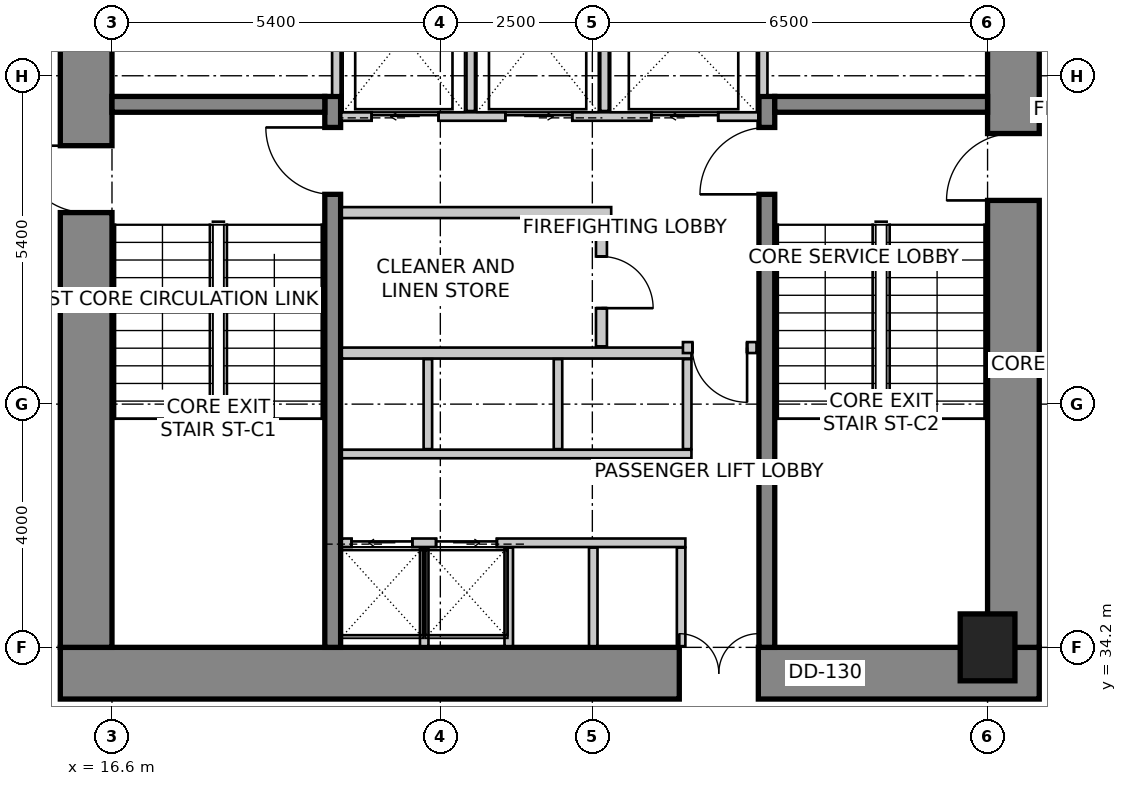
"""IFC4 building model, lengths in metres.
Left out: names, types, materials, properties, quantities, classifications, styles, units other than length and angle.
Written with IfcOpenShell. Run it as: python <this file> out.ifc"""

import sys

from ifc_helpers import new_model, si_unit, direction, frame, frame_2d, origin, origin_2d, place, context, subcontext, project, spatial, rectangle, extrude, source, transform, mapped, element, fill, save


model = new_model("IFC4")
c1 = context("Model", 3, precision=1e-05, world=origin(), true_north=direction((0.0, 1.0)))
c2 = subcontext(c1, "Body", "Model", "MODEL_VIEW")
j1 = project(units=[si_unit("LENGTHUNIT", "METRE"), si_unit("PLANEANGLEUNIT", "RADIAN")], contexts=[c1])
p1 = place(None, origin())
s1 = spatial("IfcSite", under=j1, at=p1, CompositionType="ELEMENT")
p2 = place(p1, origin())
s2 = spatial("IfcBuilding", under=s1, at=p2, CompositionType="ELEMENT")
p3 = place(p2, frame((0.0, 0.0, 43.0)))
s3 = spatial("IfcBuildingStorey", under=s2, at=p3, CompositionType="ELEMENT", Elevation=43.0)
p4 = place(p3, frame((15.75, 33.775, 0.0), z_axis=(0.0, 0.0, 1.0), x_axis=(1.0, 0.0, 0.0)))
e1 = element("IfcWall", 1, at=p4, inside=s3, PredefinedType="SHEAR", context=c2, shape_type="SweptSolid", body=[
    extrude(rectangle(XDim=16.1, YDim=0.85, at=frame_2d((8.05, 0.0))), origin(), (0.0, 0.0, 1.0), 4.0),
])
m1 = source(origin(), c2, "Body", "SweptSolid", [
    extrude(rectangle(XDim=1.3, YDim=2.15, at=frame_2d((0.65, 1.075))), frame((0.0, 0.435, 0.0), z_axis=(0.0, -1.0, 0.0), x_axis=(1.0, 0.0, 0.0)), (0.0, 0.0, 1.0), 0.87),
])
p5 = place(p4, frame((10.18, 0.0, 0.0)))
e2 = element("IfcOpeningElement", 2, at=p5, cuts=e1, PredefinedType="OPENING", context=c2, shape_type="MappedRepresentation", body=[
    mapped(m1, transform((0.0, 0.0, 0.0), scale=1.0)),
])
p6 = place(p3, frame((16.175, 34.2, 0.0), z_axis=(0.0, 0.0, 1.0), x_axis=(0.0, 1.0, 0.0)))
e3 = element("IfcWall", 3, at=p6, inside=s3, PredefinedType="SHEAR", context=c2, shape_type="SweptSolid", body=[
    extrude(rectangle(XDim=11.4, YDim=0.85, at=frame_2d((5.7, 0.0))), origin(), (0.0, 0.0, 1.0), 4.0),
])
m2 = source(origin(), c2, "Body", "SweptSolid", [
    extrude(rectangle(XDim=1.1, YDim=2.15, at=frame_2d((0.55, 1.075))), frame((0.0, 0.435, 0.0), z_axis=(0.0, -1.0, 0.0), x_axis=(1.0, 0.0, 0.0)), (0.0, 0.0, 1.0), 0.87),
])
p7 = place(p6, frame((7.15, 0.0, 0.0)))
e4 = element("IfcOpeningElement", 4, at=p7, cuts=e3, PredefinedType="OPENING", context=c2, shape_type="MappedRepresentation", body=[
    mapped(m2, transform((0.0, 0.0, 0.0), scale=1.0)),
])
p8 = place(p3, frame((31.425, 34.2, 0.0), z_axis=(0.0, 0.0, 1.0), x_axis=(0.0, 1.0, 0.0)))
e5 = element("IfcWall", 5, at=p8, inside=s3, PredefinedType="SHEAR", context=c2, shape_type="SweptSolid", body=[
    extrude(rectangle(XDim=11.4, YDim=0.85, at=frame_2d((5.7, 0.0))), origin(), (0.0, 0.0, 1.0), 4.0),
])
p9 = place(p8, frame((7.35, 0.0, 0.0)))
e6 = element("IfcOpeningElement", 6, at=p9, cuts=e5, PredefinedType="OPENING", context=c2, shape_type="MappedRepresentation", body=[
    mapped(m2, transform((0.0, 0.0, 0.0), scale=1.0)),
])
p10 = place(p3, frame((20.23, 34.2, 0.0), z_axis=(0.0, 0.0, 1.0), x_axis=(0.0, 1.0, 0.0)))
e7 = element("IfcWall", 7, at=p10, inside=s3, PredefinedType="SHEAR", context=c2, shape_type="SweptSolid", body=[
    extrude(rectangle(XDim=9.06, YDim=0.26, at=frame_2d((4.53, 0.0))), origin(), (0.0, 0.0, 1.0), 4.0),
])
m3 = source(origin(), c2, "Body", "SweptSolid", [
    extrude(rectangle(XDim=1.1, YDim=2.15, at=frame_2d((0.55, 1.075))), frame((0.0, 0.14, 0.0), z_axis=(0.0, -1.0, 0.0), x_axis=(1.0, 0.0, 0.0)), (0.0, 0.0, 1.0), 0.28),
])
p11 = place(p10, frame((7.45, 0.0, 0.0)))
e8 = element("IfcOpeningElement", 8, at=p11, cuts=e7, PredefinedType="OPENING", context=c2, shape_type="MappedRepresentation", body=[
    mapped(m3, transform((0.0, 0.0, 0.0), scale=1.0)),
])
p12 = place(p3, frame((27.37, 34.2, 0.0), z_axis=(0.0, 0.0, 1.0), x_axis=(0.0, 1.0, 0.0)))
e9 = element("IfcWall", 9, at=p12, inside=s3, PredefinedType="SHEAR", context=c2, shape_type="SweptSolid", body=[
    extrude(rectangle(XDim=9.06, YDim=0.26, at=frame_2d((4.53, 0.0))), origin(), (0.0, 0.0, 1.0), 4.0),
])
p13 = place(p12, frame((7.45, 0.0, 0.0)))
e10 = element("IfcOpeningElement", 10, at=p13, cuts=e9, PredefinedType="OPENING", context=c2, shape_type="MappedRepresentation", body=[
    mapped(m3, transform((0.0, 0.0, 0.0), scale=1.0)),
])
for number, where, z_axis, x_axis in (
    (11, (16.6, 43.13, 0.0), (0.0, 0.0, 1.0), (1.0, 0.0, 0.0)),
    (12, (27.5, 43.13, 0.0), (0.0, 0.0, 1.0), (1.0, 0.0, 0.0)),
):
    element("IfcWall", number, at=place(p3, frame(where, z_axis=z_axis, x_axis=x_axis)), inside=s3, PredefinedType="SHEAR", context=c2, shape_type="SweptSolid", body=[
        extrude(rectangle(XDim=3.5, YDim=0.26, at=frame_2d((1.75, 0.0))), origin(), (0.0, 0.0, 1.0), 4.0),
    ])
m4 = source(origin(), c2, "Body", "SweptSolid", [
    extrude(rectangle(XDim=0.9, YDim=1.1, at=origin_2d()), origin(), (0.0, 0.0, 1.0), 4.0),
])
p14 = place(p3, frame((31.0, 34.2, 0.0), z_axis=(0.0, 0.0, 1.0), x_axis=(1.0, 0.0, 0.0)))
e13 = element("IfcColumn", 13, at=p14, inside=s3, PredefinedType="COLUMN", context=c2, shape_type="MappedRepresentation", body=[
    mapped(m4, transform((0.0, 0.0, 0.0), scale=1.0)),
])
p15 = place(p3, frame((20.37, 42.93, 0.0), z_axis=(0.0, 0.0, 1.0), x_axis=(1.0, 0.0, 0.0)))
e14 = element("IfcWall", 14, at=p15, inside=s3, PredefinedType="SOLIDWALL", context=c2, shape_type="SweptSolid", body=[
    extrude(rectangle(XDim=6.86, YDim=0.14, at=frame_2d((3.43, 0.0))), origin(), (0.0, 0.0, 1.0), 3.75),
])
m5 = source(origin(), c2, "Body", "SweptSolid", [
    extrude(rectangle(XDim=1.1, YDim=2.15, at=frame_2d((0.55, 1.075))), frame((0.0, 0.08, 0.0), z_axis=(0.0, -1.0, 0.0), x_axis=(1.0, 0.0, 0.0)), (0.0, 0.0, 1.0), 0.16),
])
p16 = place(p15, frame((0.5, 0.0, 0.0)))
e15 = element("IfcOpeningElement", 15, at=p16, cuts=e14, PredefinedType="OPENING", context=c2, shape_type="MappedRepresentation", body=[
    mapped(m5, transform((0.0, 0.0, 0.0), scale=1.0)),
])
p17 = place(p15, frame((2.7, 0.0, 0.0)))
e16 = element("IfcOpeningElement", 16, at=p17, cuts=e14, PredefinedType="OPENING", context=c2, shape_type="MappedRepresentation", body=[
    mapped(m5, transform((0.0, 0.0, 0.0), scale=1.0)),
])
p18 = place(p15, frame((5.1, 0.0, 0.0)))
e17 = element("IfcOpeningElement", 17, at=p18, cuts=e14, PredefinedType="OPENING", context=c2, shape_type="MappedRepresentation", body=[
    mapped(m5, transform((0.0, 0.0, 0.0), scale=1.0)),
])
for number, where, z_axis, x_axis in (
    (18, (20.29, 43.28, 0.0), (0.0, 0.0, 1.0), (0.0, 1.0, 0.0)),
    (19, (27.31, 43.28, 0.0), (0.0, 0.0, 1.0), (0.0, 1.0, 0.0)),
):
    element("IfcWall", number, at=place(p3, frame(where, z_axis=z_axis, x_axis=x_axis)), inside=s3, PredefinedType="SOLIDWALL", context=c2, shape_type="SweptSolid", body=[
        extrude(rectangle(XDim=2.3, YDim=0.14, at=frame_2d((1.15, 0.0))), origin(), (0.0, 0.0, 1.0), 3.75),
    ])
for number, where, z_axis, x_axis in (
    (20, (22.5, 43.02, 0.0), (0.0, 0.0, 1.0), (0.0, 1.0, 0.0)),
    (21, (24.7, 43.02, 0.0), (0.0, 0.0, 1.0), (0.0, 1.0, 0.0)),
):
    element("IfcWall", number, at=place(p3, frame(where, z_axis=z_axis, x_axis=x_axis)), inside=s3, PredefinedType="SOLIDWALL", context=c2, shape_type="SweptSolid", body=[
        extrude(rectangle(XDim=2.56, YDim=0.14, at=frame_2d((1.28, 0.0))), origin(), (0.0, 0.0, 1.0), 3.75),
    ])
p19 = place(p3, frame((20.38, 35.92, 0.0), z_axis=(0.0, 0.0, 1.0), x_axis=(1.0, 0.0, 0.0)))
e22 = element("IfcWall", 22, at=p19, inside=s3, PredefinedType="SOLIDWALL", context=c2, shape_type="SweptSolid", body=[
    extrude(rectangle(XDim=5.65, YDim=0.14, at=frame_2d((2.825, 0.0))), origin(), (0.0, 0.0, 1.0), 3.75),
])
m6 = source(origin(), c2, "Body", "SweptSolid", [
    extrude(rectangle(XDim=1.0, YDim=2.15, at=frame_2d((0.5, 1.075))), frame((0.0, 0.08, 0.0), z_axis=(0.0, -1.0, 0.0), x_axis=(1.0, 0.0, 0.0)), (0.0, 0.0, 1.0), 0.16),
])
p20 = place(p19, frame((0.16, 0.0, 0.0)))
e23 = element("IfcOpeningElement", 23, at=p20, cuts=e22, PredefinedType="OPENING", context=c2, shape_type="MappedRepresentation", body=[
    mapped(m6, transform((0.0, 0.0, 0.0), scale=1.0)),
])
p21 = place(p19, frame((1.55, 0.0, 0.0)))
e24 = element("IfcOpeningElement", 24, at=p21, cuts=e22, PredefinedType="OPENING", context=c2, shape_type="MappedRepresentation", body=[
    mapped(m6, transform((0.0, 0.0, 0.0), scale=1.0)),
])
for number, where, z_axis, x_axis in (
    (25, (25.96, 34.22, 0.0), (0.0, 0.0, 1.0), (0.0, 1.0, 0.0)),
    (26, (21.735, 34.22, 0.0), (0.0, 0.0, 1.0), (0.0, 1.0, 0.0)),
    (27, (23.125, 34.22, 0.0), (0.0, 0.0, 1.0), (0.0, 1.0, 0.0)),
    (28, (24.515, 34.22, 0.0), (0.0, 0.0, 1.0), (0.0, 1.0, 0.0)),
):
    element("IfcWall", number, at=place(p3, frame(where, z_axis=z_axis, x_axis=x_axis)), inside=s3, PredefinedType="SOLIDWALL", context=c2, shape_type="SweptSolid", body=[
        extrude(rectangle(XDim=1.62, YDim=0.14, at=frame_2d((0.81, 0.0))), origin(), (0.0, 0.0, 1.0), 3.042),
    ])
p22 = place(p3, frame((20.38, 37.38, 0.0), z_axis=(0.0, 0.0, 1.0), x_axis=(1.0, 0.0, 0.0)))
e29 = element("IfcWall", 29, at=p22, inside=s3, PredefinedType="SOLIDWALL", context=c2, shape_type="SweptSolid", body=[
    extrude(rectangle(XDim=5.75, YDim=0.14, at=frame_2d((2.875, 0.0))), origin(), (0.0, 0.0, 1.0), 3.75),
])
p23 = place(p3, frame((20.38, 39.04, 0.0), z_axis=(0.0, 0.0, 1.0), x_axis=(1.0, 0.0, 0.0)))
e30 = element("IfcWall", 30, at=p23, inside=s3, PredefinedType="SOLIDWALL", context=c2, shape_type="SweptSolid", body=[
    extrude(rectangle(XDim=5.75, YDim=0.18, at=frame_2d((2.875, 0.0))), origin(), (0.0, 0.0, 1.0), 3.75),
])
for number, where, z_axis, x_axis in (
    (31, (26.06, 37.46, 0.0), (0.0, 0.0, 1.0), (0.0, 1.0, 0.0)),
    (32, (21.795, 37.46, 0.0), (0.0, 0.0, 1.0), (0.0, 1.0, 0.0)),
    (33, (23.935, 37.46, 0.0), (0.0, 0.0, 1.0), (0.0, 1.0, 0.0)),
):
    element("IfcWall", number, at=place(p3, frame(where, z_axis=z_axis, x_axis=x_axis)), inside=s3, PredefinedType="SOLIDWALL", context=c2, shape_type="SweptSolid", body=[
        extrude(rectangle(XDim=1.48, YDim=0.14, at=frame_2d((0.74, 0.0))), origin(), (0.0, 0.0, 1.0), 3.75),
    ])
p24 = place(p3, frame((24.81, 41.35, 0.0), z_axis=(0.0, 0.0, 1.0), x_axis=(-1.0, 0.0, 0.0)))
e34 = element("IfcWall", 34, at=p24, inside=s3, PredefinedType="PARTITIONING", context=c2, shape_type="SweptSolid", body=[
    extrude(rectangle(XDim=4.43, YDim=0.18, at=frame_2d((2.215, 0.0))), origin(), (0.0, 0.0, 1.0), 3.75),
])
p25 = place(p3, frame((24.65, 41.256, 0.0), z_axis=(0.0, 0.0, 1.0), x_axis=(0.0, -1.0, 0.0)))
e35 = element("IfcWall", 35, at=p25, inside=s3, PredefinedType="PARTITIONING", context=c2, shape_type="SweptSolid", body=[
    extrude(rectangle(XDim=2.106, YDim=0.18, at=frame_2d((1.053, 0.0))), origin(), (0.0, 0.0, 1.0), 3.75),
])
m7 = source(origin(), c2, "Body", "SweptSolid", [
    extrude(rectangle(XDim=0.85, YDim=2.15, at=frame_2d((0.425, 1.075))), frame((0.0, 0.1, 0.0), z_axis=(0.0, -1.0, 0.0), x_axis=(1.0, 0.0, 0.0)), (0.0, 0.0, 1.0), 0.2),
])
p26 = place(p25, frame((0.628, 0.0, 0.0)))
e36 = element("IfcOpeningElement", 36, at=p26, cuts=e35, PredefinedType="OPENING", context=c2, shape_type="MappedRepresentation", body=[
    mapped(m7, transform((0.0, 0.0, 0.0), scale=1.0)),
])
p27 = place(p3, frame((27.2, 39.13, 0.0), z_axis=(0.0, 0.0, 1.0), x_axis=(-1.0, 0.0, 0.0)))
e37 = element("IfcWall", 37, at=p27, inside=s3, PredefinedType="PARTITIONING", context=c2, shape_type="SweptSolid", body=[
    extrude(rectangle(XDim=1.21, YDim=0.18, at=frame_2d((0.605, 0.0))), origin(), (0.0, 0.0, 1.0), 3.75),
])
m8 = source(origin(), c2, "Body", "SweptSolid", [
    extrude(rectangle(XDim=0.9, YDim=2.15, at=frame_2d((0.45, 1.075))), frame((0.0, 0.1, 0.0), z_axis=(0.0, -1.0, 0.0), x_axis=(1.0, 0.0, 0.0)), (0.0, 0.0, 1.0), 0.2),
])
p28 = place(p27, frame((0.155, 0.0, 0.0)))
e38 = element("IfcOpeningElement", 38, at=p28, cuts=e37, PredefinedType="OPENING", context=c2, shape_type="MappedRepresentation", body=[
    mapped(m8, transform((0.0, 0.0, 0.0), scale=1.0)),
])
m9 = source(origin(), c2, "Body", "SweptSolid", [
    extrude(rectangle(XDim=1.1, YDim=2.15, at=frame_2d((0.55, 1.075))), frame((0.0, 0.025, 0.0), z_axis=(0.0, -1.0, 0.0), x_axis=(1.0, 0.0, 0.0)), (0.0, 0.0, 1.0), 0.05),
])
p29 = place(p16, origin())
e39 = element("IfcDoor", 39, at=p29, inside=s3, OperationType="SLIDING_TO_LEFT", PredefinedType="DOOR", context=c2, shape_type="MappedRepresentation", body=[
    mapped(m9, transform((0.0, 0.0, 0.0), scale=1.0)),
])
fill(e15, e39)
p30 = place(p17, origin())
e40 = element("IfcDoor", 40, at=p30, inside=s3, OperationType="SLIDING_TO_RIGHT", PredefinedType="DOOR", context=c2, shape_type="MappedRepresentation", body=[
    mapped(m9, transform((0.0, 0.0, 0.0), scale=1.0)),
])
fill(e16, e40)
m10 = source(origin(), c2, "Body", "SweptSolid", [
    extrude(rectangle(XDim=1.1, YDim=2.15, at=frame_2d((0.55, 1.075))), frame((0.0, 0.025, 0.0), z_axis=(0.0, -1.0, 0.0), x_axis=(1.0, 0.0, 0.0)), (0.0, 0.0, 1.0), 0.05),
])
p31 = place(p18, origin())
e41 = element("IfcDoor", 41, at=p31, inside=s3, OperationType="SLIDING_TO_LEFT", PredefinedType="DOOR", context=c2, shape_type="MappedRepresentation", body=[
    mapped(m10, transform((0.0, 0.0, 0.0), scale=1.0)),
])
fill(e17, e41)
m11 = source(origin(), c2, "Body", "SweptSolid", [
    extrude(rectangle(XDim=1.0, YDim=2.15, at=frame_2d((0.5, 1.075))), frame((0.0, 0.025, 0.0), z_axis=(0.0, -1.0, 0.0), x_axis=(1.0, 0.0, 0.0)), (0.0, 0.0, 1.0), 0.05),
])
p32 = place(p20, origin())
e42 = element("IfcDoor", 42, at=p32, inside=s3, OperationType="SLIDING_TO_LEFT", PredefinedType="DOOR", context=c2, shape_type="MappedRepresentation", body=[
    mapped(m11, transform((0.0, 0.0, 0.0), scale=1.0)),
])
fill(e23, e42)
p33 = place(p21, origin())
e43 = element("IfcDoor", 43, at=p33, inside=s3, OperationType="SLIDING_TO_RIGHT", PredefinedType="DOOR", context=c2, shape_type="MappedRepresentation", body=[
    mapped(m11, transform((0.0, 0.0, 0.0), scale=1.0)),
])
fill(e24, e43)
m12 = source(origin(), c2, "Body", "SweptSolid", [
    extrude(rectangle(XDim=1.1, YDim=2.15, at=frame_2d((0.55, 1.075))), frame((0.0, 0.025, 0.0), z_axis=(0.0, -1.0, 0.0), x_axis=(1.0, 0.0, 0.0)), (0.0, 0.0, 1.0), 0.05),
])
p34 = place(p11, origin())
e44 = element("IfcDoor", 44, at=p34, inside=s3, OperationType="SINGLE_SWING_RIGHT", PredefinedType="DOOR", context=c2, shape_type="MappedRepresentation", body=[
    mapped(m12, transform((0.0, 0.0, 0.0), scale=1.0)),
])
fill(e8, e44)
p35 = place(p13, origin())
e45 = element("IfcDoor", 45, at=p35, inside=s3, OperationType="SINGLE_SWING_LEFT", PredefinedType="DOOR", context=c2, shape_type="MappedRepresentation", body=[
    mapped(m12, transform((0.0, 0.0, 0.0), scale=1.0)),
])
fill(e10, e45)
p36 = place(p7, origin())
e46 = element("IfcDoor", 46, at=p36, inside=s3, OperationType="SINGLE_SWING_RIGHT", PredefinedType="DOOR", context=c2, shape_type="MappedRepresentation", body=[
    mapped(m12, transform((0.0, 0.0, 0.0), scale=1.0)),
])
fill(e4, e46)
p37 = place(p9, origin())
e47 = element("IfcDoor", 47, at=p37, inside=s3, OperationType="SINGLE_SWING_LEFT", PredefinedType="DOOR", context=c2, shape_type="MappedRepresentation", body=[
    mapped(m12, transform((0.0, 0.0, 0.0), scale=1.0)),
])
fill(e6, e47)
m13 = source(origin(), c2, "Body", "SweptSolid", [
    extrude(rectangle(XDim=1.3, YDim=2.15, at=frame_2d((0.65, 1.075))), frame((0.0, 0.025, 0.0), z_axis=(0.0, -1.0, 0.0), x_axis=(1.0, 0.0, 0.0)), (0.0, 0.0, 1.0), 0.05),
])
p38 = place(p5, origin())
e48 = element("IfcDoor", 48, at=p38, inside=s3, OperationType="DOUBLE_DOOR_SINGLE_SWING", PredefinedType="DOOR", context=c2, shape_type="MappedRepresentation", body=[
    mapped(m13, transform((0.0, 0.0, 0.0), scale=1.0)),
])
fill(e2, e48)
m14 = source(origin(), c2, "Body", "SweptSolid", [
    extrude(rectangle(XDim=0.85, YDim=2.15, at=frame_2d((0.425, 1.075))), frame((0.0, 0.025, 0.0), z_axis=(0.0, -1.0, 0.0), x_axis=(1.0, 0.0, 0.0)), (0.0, 0.0, 1.0), 0.05),
])
p39 = place(p26, origin())
e49 = element("IfcDoor", 49, at=p39, inside=s3, OperationType="SINGLE_SWING_RIGHT", PredefinedType="DOOR", context=c2, shape_type="MappedRepresentation", body=[
    mapped(m14, transform((0.0, 0.0, 0.0), scale=1.0)),
])
fill(e36, e49)
m15 = source(origin(), c2, "Body", "SweptSolid", [
    extrude(rectangle(XDim=0.9, YDim=2.15, at=frame_2d((0.45, 1.075))), frame((0.0, 0.025, 0.0), z_axis=(0.0, -1.0, 0.0), x_axis=(1.0, 0.0, 0.0)), (0.0, 0.0, 1.0), 0.05),
])
p40 = place(p28, origin())
e50 = element("IfcDoor", 50, at=p40, inside=s3, OperationType="SINGLE_SWING_LEFT", PredefinedType="DOOR", context=c2, shape_type="MappedRepresentation", body=[
    mapped(m15, transform((0.0, 0.0, 0.0), scale=1.0)),
])
fill(e38, e50)
save(model, sys.argv[1])
